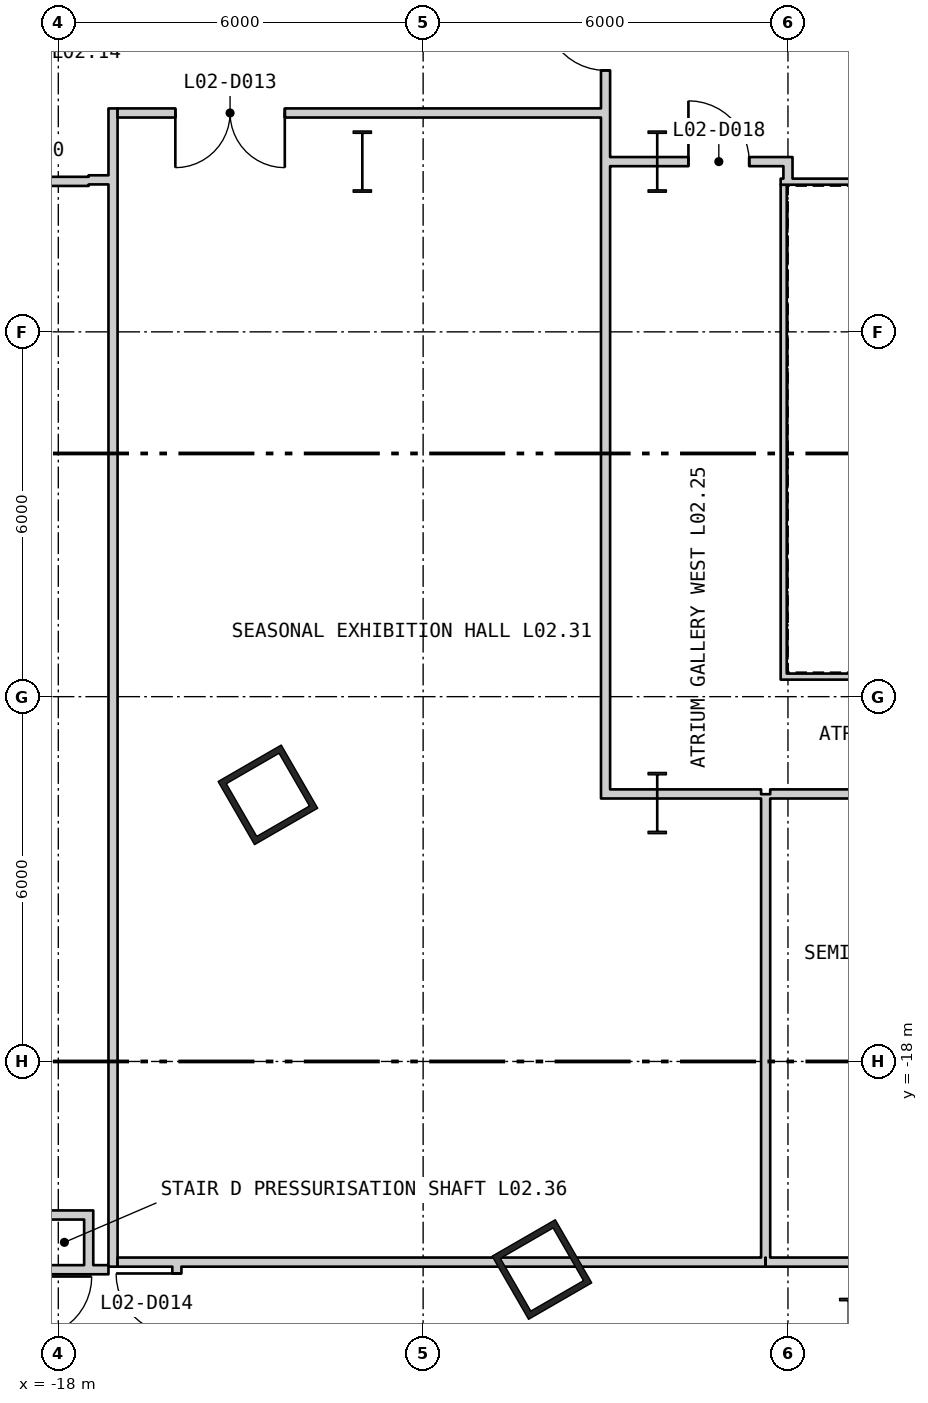
"""IFC4 building model, lengths in metres.
Left out: names, types, materials, properties, quantities, classifications, styles, units other than length and angle.
Written with IfcOpenShell. Run it as: python <this file> out.ifc"""

import sys

from ifc_helpers import new_model, si_unit, direction, frame, frame_2d, origin, origin_2d, place, context, subcontext, project, spatial, rectangle, hollow_rectangle, i_section, extrude, element, fill, save


model = new_model("IFC4")
c1 = context("Model", 3, precision=1e-05, world=origin(), true_north=direction((0.0, 1.0)))
c2 = subcontext(c1, "Body", "Model", "MODEL_VIEW")
j1 = project(units=[si_unit("LENGTHUNIT", "METRE"), si_unit("PLANEANGLEUNIT", "RADIAN")], contexts=[c1])
p1 = place(None, origin())
s1 = spatial("IfcSite", under=j1, at=p1, CompositionType="ELEMENT")
p2 = place(p1, origin())
s2 = spatial("IfcBuilding", under=s1, at=p2, CompositionType="ELEMENT")
p3 = place(p2, frame((0.0, 0.0, 13.5)))
s3 = spatial("IfcBuildingStorey", under=s2, at=p3, CompositionType="ELEMENT", Elevation=13.5)
for number, where, z_axis, x_axis in (
    (1, (-14.553, -13.615, 0.0), (0.0, 0.0, 1.0), (0.5, -0.866, 0.0)),
    (2, (-10.046, -21.422, 0.0), (0.0, 0.0, 1.0), (0.5, -0.866, 0.0)),
):
    element("IfcColumn", number, at=place(p3, frame(where, z_axis=z_axis, x_axis=x_axis)), inside=s3, PredefinedType="COLUMN", context=c2, shape_type="SweptSolid", body=[
        extrude(hollow_rectangle(XDim=1.2, YDim=1.2, WallThickness=0.1, at=origin_2d()), origin(), (0.0, 0.0, 1.0), 5.1),
    ])
for number, where, z_axis, x_axis in (
    (3, (-8.15, -3.2, 0.0), (0.0, 0.0, 1.0), (1.0, 0.0, 0.0)),
    (4, (-8.15, -13.75, 0.0), (0.0, 0.0, 1.0), (1.0, 0.0, 0.0)),
    (5, (-5.0, -22.4, 0.0), (0.0, 0.0, 1.0), (1.0, 0.0, 0.0)),
    (6, (-13.0, -3.2, 0.0), (0.0, 0.0, 1.0), (1.0, 0.0, 0.0)),
):
    element("IfcColumn", number, at=place(p3, frame(where, z_axis=z_axis, x_axis=x_axis)), inside=s3, PredefinedType="COLUMN", context=c2, shape_type="SweptSolid", body=[
        extrude(i_section(OverallWidth=0.302, OverallDepth=1.008, WebThickness=0.021, FlangeThickness=0.04, at=origin_2d()), origin(), (0.0, 0.0, 1.0), 5.1),
    ])
for number, where, z_axis, x_axis in (
    (7, (-6.12, -11.67, 0.0), (0.0, 0.0, 1.0), (1.0, 0.0, 0.0)),
    (8, (6.12, -3.53, 0.0), (0.0, 0.0, 1.0), (-1.0, 0.0, 0.0)),
):
    element("IfcWall", number, at=place(p3, frame(where, z_axis=z_axis, x_axis=x_axis)), inside=s3, PredefinedType="PARTITIONING", context=c2, shape_type="SweptSolid", body=[
        extrude(rectangle(XDim=12.24, YDim=0.1, at=frame_2d((6.12, 0.0))), origin(), (0.0, 0.0, 1.0), 4.88),
    ])
p4 = place(p3, frame((-6.07, -3.58, 0.0), z_axis=(0.0, 0.0, 1.0), x_axis=(0.0, -1.0, 0.0)))
e9 = element("IfcWall", 9, at=p4, inside=s3, PredefinedType="PARTITIONING", context=c2, shape_type="SweptSolid", body=[
    extrude(rectangle(XDim=8.04, YDim=0.1, at=frame_2d((4.02, 0.0))), origin(), (0.0, 0.0, 1.0), 4.88),
])
p5 = place(p3, frame((-19.825, -3.525, 0.0), z_axis=(0.0, 0.0, 1.0), x_axis=(1.0, 0.0, 0.0)))
e10 = element("IfcWall", 10, at=p5, inside=s3, PredefinedType="PARTITIONING", context=c2, shape_type="SweptSolid", body=[
    extrude(rectangle(XDim=2.325, YDim=0.15, at=frame_2d((1.163, 0.0))), origin(), (0.0, 0.0, 1.0), 4.88),
])
p6 = place(p5, frame((0.662, 0.0, 0.0)))
e11 = element("IfcOpeningElement", 11, at=p6, cuts=e10, PredefinedType="OPENING", context=c2, shape_type="SweptSolid", body=[
    extrude(rectangle(XDim=1.0, YDim=2.1, at=frame_2d((0.5, 1.05))), frame((0.0, 0.085, 0.0), z_axis=(0.0, -1.0, 0.0), x_axis=(1.0, 0.0, 0.0)), (0.0, 0.0, 1.0), 0.17),
])
for number, where, z_axis, x_axis in (
    (12, (-18.225, -21.425, 0.0), (0.0, 0.0, 1.0), (1.0, 0.0, 0.0)),
    (13, (-18.225, -20.525, 0.0), (0.0, 0.0, 1.0), (1.0, 0.0, 0.0)),
):
    element("IfcWall", number, at=place(p3, frame(where, z_axis=z_axis, x_axis=x_axis)), inside=s3, PredefinedType="PARTITIONING", context=c2, shape_type="SweptSolid", body=[
        extrude(rectangle(XDim=0.65, YDim=0.15, at=frame_2d((0.325, 0.0))), origin(), (0.0, 0.0, 1.0), 4.88),
    ])
p7 = place(p3, frame((-17.5, -21.5, 0.0), z_axis=(0.0, 0.0, 1.0), x_axis=(0.0, 1.0, 0.0)))
e14 = element("IfcWall", 14, at=p7, inside=s3, PredefinedType="PARTITIONING", context=c2, shape_type="SweptSolid", body=[
    extrude(rectangle(XDim=1.05, YDim=0.15, at=frame_2d((0.525, 0.0))), origin(), (0.0, 0.0, 1.0), 4.88),
])
p8 = place(p3, frame((-17.5, -3.5, 0.0), z_axis=(0.0, 0.0, 1.0), x_axis=(1.0, 0.0, 0.0)))
e15 = element("IfcWall", 15, at=p8, inside=s3, PredefinedType="PARTITIONING", context=c2, shape_type="SweptSolid", body=[
    extrude(rectangle(XDim=0.325, YDim=0.15, at=frame_2d((0.163, 0.0))), origin(), (0.0, 0.0, 1.0), 4.88),
])
p9 = place(p3, frame((-17.425, -21.425, 0.0), z_axis=(0.0, 0.0, 1.0), x_axis=(1.0, 0.0, 0.0)))
e16 = element("IfcWall", 16, at=p9, inside=s3, PredefinedType="PARTITIONING", context=c2, shape_type="SweptSolid", body=[
    extrude(rectangle(XDim=0.25, YDim=0.15, at=frame_2d((0.125, 0.0))), origin(), (0.0, 0.0, 1.0), 4.88),
])
p10 = place(p3, frame((-17.1, -21.375, 0.0), z_axis=(0.0, 0.0, 1.0), x_axis=(0.0, 1.0, 0.0)))
e17 = element("IfcWall", 17, at=p10, inside=s3, PredefinedType="PARTITIONING", context=c2, shape_type="SweptSolid", body=[
    extrude(rectangle(XDim=19.05, YDim=0.15, at=frame_2d((9.525, 0.0))), origin(), (0.0, 0.0, 1.0), 4.88),
])
p11 = place(p3, frame((-17.025, -21.3, 0.0), z_axis=(0.0, 0.0, 1.0), x_axis=(1.0, 0.0, 0.0)))
e18 = element("IfcWall", 18, at=p11, inside=s3, PredefinedType="PARTITIONING", context=c2, shape_type="SweptSolid", body=[
    extrude(rectangle(XDim=10.654, YDim=0.15, at=frame_2d((5.327, 0.0))), origin(), (0.0, 0.0, 1.0), 4.88),
])
p12 = place(p3, frame((-17.025, -2.4, 0.0), z_axis=(0.0, 0.0, 1.0), x_axis=(1.0, 0.0, 0.0)))
e19 = element("IfcWall", 19, at=p12, inside=s3, PredefinedType="PARTITIONING", context=c2, shape_type="SweptSolid", body=[
    extrude(rectangle(XDim=7.95, YDim=0.15, at=frame_2d((3.975, 0.0))), origin(), (0.0, 0.0, 1.0), 4.88),
])
p13 = place(p12, frame((0.95, 0.0, 0.0)))
e20 = element("IfcOpeningElement", 20, at=p13, cuts=e19, PredefinedType="OPENING", context=c2, shape_type="SweptSolid", body=[
    extrude(rectangle(XDim=1.8, YDim=2.1, at=frame_2d((0.9, 1.05))), frame((0.0, 0.085, 0.0), z_axis=(0.0, -1.0, 0.0), x_axis=(1.0, 0.0, 0.0)), (0.0, 0.0, 1.0), 0.17),
])
p14 = place(p3, frame((-16.05, -23.55, 0.0), z_axis=(0.0, 0.0, 1.0), x_axis=(0.0, 1.0, 0.0)))
e21 = element("IfcWall", 21, at=p14, inside=s3, PredefinedType="PARTITIONING", context=c2, shape_type="SweptSolid", body=[
    extrude(rectangle(XDim=2.175, YDim=0.15, at=frame_2d((1.087, 0.0))), origin(), (0.0, 0.0, 1.0), 4.88),
])
p15 = place(p14, frame((1.063, 0.0, 0.0)))
e22 = element("IfcOpeningElement", 22, at=p15, cuts=e21, PredefinedType="OPENING", context=c2, shape_type="SweptSolid", body=[
    extrude(rectangle(XDim=1.0, YDim=2.1, at=frame_2d((0.5, 1.05))), frame((0.0, 0.085, 0.0), z_axis=(0.0, -1.0, 0.0), x_axis=(1.0, 0.0, 0.0)), (0.0, 0.0, 1.0), 0.17),
])
p16 = place(p3, frame((-9.0, -13.675, 0.0), z_axis=(0.0, 0.0, 1.0), x_axis=(0.0, 1.0, 0.0)))
e23 = element("IfcWall", 23, at=p16, inside=s3, PredefinedType="PARTITIONING", context=c2, shape_type="SweptSolid", body=[
    extrude(rectangle(XDim=13.675, YDim=0.15, at=frame_2d((6.838, 0.0))), origin(), (0.0, 0.0, 1.0), 4.88),
])
p17 = place(p16, frame((11.975, 0.0, 0.0)))
e24 = element("IfcOpeningElement", 24, at=p17, cuts=e23, PredefinedType="OPENING", context=c2, shape_type="SweptSolid", body=[
    extrude(rectangle(XDim=1.0, YDim=2.1, at=frame_2d((0.5, 1.05))), frame((0.0, 0.085, 0.0), z_axis=(0.0, -1.0, 0.0), x_axis=(1.0, 0.0, 0.0)), (0.0, 0.0, 1.0), 0.17),
])
p18 = place(p3, frame((-8.925, -13.6, 0.0), z_axis=(0.0, 0.0, 1.0), x_axis=(1.0, 0.0, 0.0)))
e25 = element("IfcWall", 25, at=p18, inside=s3, PredefinedType="PARTITIONING", context=c2, shape_type="SweptSolid", body=[
    extrude(rectangle(XDim=0.775, YDim=0.15, at=frame_2d((0.388, 0.0))), origin(), (0.0, 0.0, 1.0), 4.09),
])
p19 = place(p3, frame((-8.15, -13.6, 0.0), z_axis=(0.0, 0.0, 1.0), x_axis=(1.0, 0.0, 0.0)))
e26 = element("IfcWall", 26, at=p19, inside=s3, PredefinedType="PARTITIONING", context=c2, shape_type="SweptSolid", body=[
    extrude(rectangle(XDim=1.708, YDim=0.15, at=frame_2d((0.854, 0.0))), origin(), (0.0, 0.0, 1.0), 3.97),
])
p20 = place(p3, frame((-8.925, -3.2, 0.0), z_axis=(0.0, 0.0, 1.0), x_axis=(1.0, 0.0, 0.0)))
e27 = element("IfcWall", 27, at=p20, inside=s3, PredefinedType="PARTITIONING", context=c2, shape_type="SweptSolid", body=[
    extrude(rectangle(XDim=0.775, YDim=0.15, at=frame_2d((0.388, 0.0))), origin(), (0.0, 0.0, 1.0), 4.09),
])
p21 = place(p3, frame((-8.15, -3.2, 0.0), z_axis=(0.0, 0.0, 1.0), x_axis=(1.0, 0.0, 0.0)))
e28 = element("IfcWall", 28, at=p21, inside=s3, PredefinedType="PARTITIONING", context=c2, shape_type="SweptSolid", body=[
    extrude(rectangle(XDim=2.225, YDim=0.15, at=frame_2d((1.113, 0.0))), origin(), (0.0, 0.0, 1.0), 3.97),
])
p22 = place(p21, frame((0.513, 0.0, 0.0)))
e29 = element("IfcOpeningElement", 29, at=p22, cuts=e28, PredefinedType="OPENING", context=c2, shape_type="SweptSolid", body=[
    extrude(rectangle(XDim=1.0, YDim=2.1, at=frame_2d((0.5, 1.05))), frame((0.0, 0.085, 0.0), z_axis=(0.0, -1.0, 0.0), x_axis=(1.0, 0.0, 0.0)), (0.0, 0.0, 1.0), 0.17),
])
p23 = place(p3, frame((-6.367, -21.3, 0.0), z_axis=(0.0, 0.0, 1.0), x_axis=(1.0, 0.0, 0.0)))
e30 = element("IfcWall", 30, at=p23, inside=s3, PredefinedType="PARTITIONING", context=c2, shape_type="SweptSolid", body=[
    extrude(rectangle(XDim=4.667, YDim=0.15, at=frame_2d((2.333, 0.0))), origin(), (0.0, 0.0, 1.0), 4.88),
])
p24 = place(p3, frame((-6.367, -21.225, 0.0), z_axis=(0.0, 0.0, 1.0), x_axis=(0.0, 1.0, 0.0)))
e31 = element("IfcWall", 31, at=p24, inside=s3, PredefinedType="PARTITIONING", context=c2, shape_type="SweptSolid", body=[
    extrude(rectangle(XDim=7.621, YDim=0.15, at=frame_2d((3.811, 0.0))), origin(), (0.0, 0.0, 1.0), 4.28),
])
p25 = place(p3, frame((-6.292, -13.6, 0.0), z_axis=(0.0, 0.0, 1.0), x_axis=(1.0, 0.0, 0.0)))
e32 = element("IfcWall", 32, at=p25, inside=s3, PredefinedType="PARTITIONING", context=c2, shape_type="SweptSolid", body=[
    extrude(rectangle(XDim=4.592, YDim=0.15, at=frame_2d((2.296, 0.0))), origin(), (0.0, 0.0, 1.0), 3.97),
])
p26 = place(p25, frame((1.886, 0.0, 0.0)))
e33 = element("IfcOpeningElement", 33, at=p26, cuts=e32, PredefinedType="OPENING", context=c2, shape_type="SweptSolid", body=[
    extrude(rectangle(XDim=1.0, YDim=2.1, at=frame_2d((0.5, 1.05))), frame((0.0, 0.085, 0.0), z_axis=(0.0, -1.0, 0.0), x_axis=(1.0, 0.0, 0.0)), (0.0, 0.0, 1.0), 0.17),
])
p27 = place(p3, frame((-6.0, -3.48, 0.0), z_axis=(0.0, 0.0, 1.0), x_axis=(0.0, 1.0, 0.0)))
e34 = element("IfcWall", 34, at=p27, inside=s3, PredefinedType="PARTITIONING", context=c2, shape_type="SweptSolid", body=[
    extrude(rectangle(XDim=0.205, YDim=0.15, at=frame_2d((0.102, 0.0))), origin(), (0.0, 0.0, 1.0), 4.88),
])
p28 = place(p13, origin())
e35 = element("IfcDoor", 35, at=p28, inside=s3, OperationType="DOUBLE_DOOR_SINGLE_SWING", PredefinedType="DOOR", context=c2, shape_type="SweptSolid", body=[
    extrude(rectangle(XDim=1.8, YDim=2.1, at=frame_2d((0.9, 1.05))), frame((0.0, 0.025, 0.0), z_axis=(0.0, -1.0, 0.0), x_axis=(1.0, 0.0, 0.0)), (0.0, 0.0, 1.0), 0.05),
])
fill(e20, e35)
p29 = place(p15, origin())
e36 = element("IfcDoor", 36, at=p29, inside=s3, OperationType="SINGLE_SWING_LEFT", PredefinedType="DOOR", context=c2, shape_type="SweptSolid", body=[
    extrude(rectangle(XDim=1.0, YDim=2.1, at=frame_2d((0.5, 1.05))), frame((0.0, 0.025, 0.0), z_axis=(0.0, -1.0, 0.0), x_axis=(1.0, 0.0, 0.0)), (0.0, 0.0, 1.0), 0.05),
])
fill(e22, e36)
p30 = place(p17, origin())
e37 = element("IfcDoor", 37, at=p30, inside=s3, OperationType="SINGLE_SWING_LEFT", PredefinedType="DOOR", context=c2, shape_type="SweptSolid", body=[
    extrude(rectangle(XDim=1.0, YDim=2.1, at=frame_2d((0.5, 1.05))), frame((0.0, 0.025, 0.0), z_axis=(0.0, -1.0, 0.0), x_axis=(1.0, 0.0, 0.0)), (0.0, 0.0, 1.0), 0.05),
])
fill(e24, e37)
p31 = place(p22, origin())
e38 = element("IfcDoor", 38, at=p31, inside=s3, OperationType="SINGLE_SWING_RIGHT", PredefinedType="DOOR", context=c2, shape_type="SweptSolid", body=[
    extrude(rectangle(XDim=1.0, YDim=2.1, at=frame_2d((0.5, 1.05))), frame((0.0, 0.025, 0.0), z_axis=(0.0, -1.0, 0.0), x_axis=(1.0, 0.0, 0.0)), (0.0, 0.0, 1.0), 0.05),
])
fill(e29, e38)
save(model, sys.argv[1])
